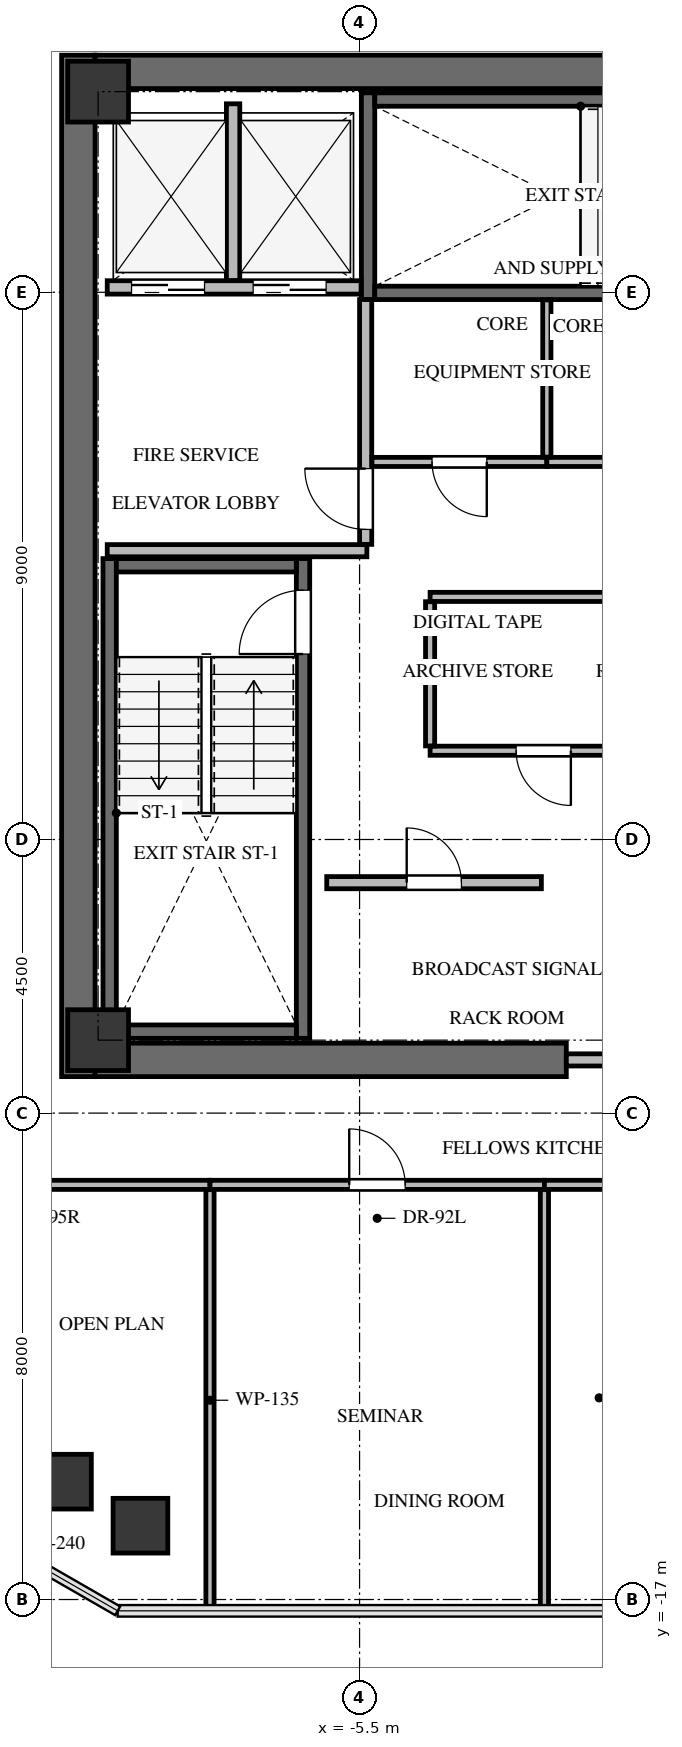
"""IFC4 building model, lengths in metres.
Left out: names, types, materials, properties, quantities, classifications, styles, units other than length and angle.
Written with IfcOpenShell. Run it as: python <this file> out.ifc"""

import sys

from ifc_helpers import new_model, si_unit, direction, frame, frame_2d, origin, origin_2d, place, context, subcontext, project, spatial, rectangle, extrude, source, transform, mapped, element, fill, save


model = new_model("IFC4")
c1 = context("Model", 3, precision=1e-05, world=origin(), true_north=direction((0.0, 1.0)))
c2 = subcontext(c1, "Body", "Model", "MODEL_VIEW")
j1 = project(units=[si_unit("LENGTHUNIT", "METRE"), si_unit("PLANEANGLEUNIT", "RADIAN")], contexts=[c1])
p1 = place(None, origin())
s1 = spatial("IfcSite", under=j1, at=p1, CompositionType="ELEMENT")
p2 = place(p1, origin())
s2 = spatial("IfcBuilding", under=s1, at=p2, CompositionType="ELEMENT")
p3 = place(p2, frame((0.0, 0.0, 254.7)))
s3 = spatial("IfcBuildingStorey", under=s2, at=p3, CompositionType="ELEMENT", Elevation=254.7)
p4 = place(p3, frame((-10.125, -8.4, 0.0), z_axis=(0.0, 0.0, 1.0), x_axis=(0.0, 1.0, 0.0)))
e1 = element("IfcWall", 1, at=p4, inside=s3, PredefinedType="SHEAR", context=c2, shape_type="SweptSolid", body=[
    extrude(rectangle(XDim=16.8, YDim=0.55, at=frame_2d((8.4, 0.0))), origin(), (0.0, 0.0, 1.0), 3.4),
])
p5 = place(p3, frame((-9.85, -8.125, 0.0), z_axis=(0.0, 0.0, 1.0), x_axis=(1.0, 0.0, 0.0)))
e2 = element("IfcWall", 2, at=p5, inside=s3, PredefinedType="SHEAR", context=c2, shape_type="SweptSolid", body=[
    extrude(rectangle(XDim=7.75, YDim=0.55, at=frame_2d((3.875, 0.0))), origin(), (0.0, 0.0, 1.0), 3.4),
])
p6 = place(p3, frame((-9.85, 8.125, 0.0), z_axis=(0.0, 0.0, 1.0), x_axis=(1.0, 0.0, 0.0)))
e3 = element("IfcWall", 3, at=p6, inside=s3, PredefinedType="SHEAR", context=c2, shape_type="SweptSolid", body=[
    extrude(rectangle(XDim=19.7, YDim=0.55, at=frame_2d((9.85, 0.0))), origin(), (0.0, 0.0, 1.0), 3.4),
])
p7 = place(p3, frame((-6.43, -7.77, -0.24), z_axis=(0.0, 0.0, 1.0), x_axis=(0.0, 1.0, 0.0)))
e4 = element("IfcWall", 4, at=p7, inside=s3, PredefinedType="SHEAR", context=c2, shape_type="SweptSolid", body=[
    extrude(rectangle(XDim=7.89, YDim=0.22, at=frame_2d((3.945, 0.0))), origin(), (0.0, 0.0, 1.0), 3.4),
])
p8 = place(p7, frame((6.32, 0.0, 0.0)))
e5 = element("IfcOpeningElement", 5, at=p8, cuts=e4, PredefinedType="OPENING", context=c2, shape_type="SweptSolid", body=[
    extrude(rectangle(XDim=1.05, YDim=2.15, at=frame_2d((0.525, 1.075))), frame((0.0, 0.12, 0.0), z_axis=(0.0, -1.0, 0.0), x_axis=(1.0, 0.0, 0.0)), (0.0, 0.0, 1.0), 0.24),
])
p9 = place(p3, frame((-9.61, 0.12, -0.24), z_axis=(0.0, 0.0, 1.0), x_axis=(0.0, -1.0, 0.0)))
e6 = element("IfcWall", 6, at=p9, inside=s3, PredefinedType="SHEAR", context=c2, shape_type="SweptSolid", body=[
    extrude(rectangle(XDim=7.89, YDim=0.22, at=frame_2d((3.945, 0.0))), origin(), (0.0, 0.0, 1.0), 3.4),
])
for number, where, z_axis, x_axis in (
    (7, (-9.5, -7.66, -0.24), (0.0, 0.0, 1.0), (1.0, 0.0, 0.0)),
    (8, (-6.54, 0.01, -0.24), (0.0, 0.0, 1.0), (-1.0, 0.0, 0.0)),
):
    element("IfcWall", number, at=place(p3, frame(where, z_axis=z_axis, x_axis=x_axis)), inside=s3, PredefinedType="SHEAR", context=c2, shape_type="SweptSolid", body=[
        extrude(rectangle(XDim=2.96, YDim=0.22, at=frame_2d((1.48, 0.0))), origin(), (0.0, 0.0, 1.0), 3.4),
    ])
p10 = place(p3, frame((-5.36, 7.78, -0.24), z_axis=(0.0, 0.0, 1.0), x_axis=(0.0, -1.0, 0.0)))
e9 = element("IfcWall", 9, at=p10, inside=s3, PredefinedType="SHEAR", context=c2, shape_type="SweptSolid", body=[
    extrude(rectangle(XDim=3.4, YDim=0.22, at=frame_2d((1.7, 0.0))), origin(), (0.0, 0.0, 1.0), 3.4),
])
p11 = place(p3, frame((-5.25, 4.49, -0.24), z_axis=(0.0, 0.0, 1.0), x_axis=(1.0, 0.0, 0.0)))
e10 = element("IfcWall", 10, at=p11, inside=s3, PredefinedType="SHEAR", context=c2, shape_type="SweptSolid", body=[
    extrude(rectangle(XDim=7.35, YDim=0.22, at=frame_2d((3.675, 0.0))), origin(), (0.0, 0.0, 1.0), 3.4),
])
p12 = place(p11, frame((5.85, 0.0, 0.0)))
e11 = element("IfcOpeningElement", 11, at=p12, cuts=e10, PredefinedType="OPENING", context=c2, shape_type="SweptSolid", body=[
    extrude(rectangle(XDim=1.05, YDim=2.15, at=frame_2d((0.525, 1.075))), frame((0.0, 0.12, 0.0), z_axis=(0.0, -1.0, 0.0), x_axis=(1.0, 0.0, 0.0)), (0.0, 0.0, 1.0), 0.24),
])
p13 = place(p3, frame((2.1, 7.67, -0.24), z_axis=(0.0, 0.0, 1.0), x_axis=(-1.0, 0.0, 0.0)))
e12 = element("IfcWall", 12, at=p13, inside=s3, PredefinedType="SHEAR", context=c2, shape_type="SweptSolid", body=[
    extrude(rectangle(XDim=7.35, YDim=0.22, at=frame_2d((3.675, 0.0))), origin(), (0.0, 0.0, 1.0), 3.4),
])
m1 = source(origin(), c2, "Body", "SweptSolid", [
    extrude(rectangle(XDim=1.0, YDim=1.0, at=origin_2d()), origin(), (0.0, 0.0, 1.0), 3.4),
])
for number, where, z_axis, x_axis in (
    (13, (-9.8, -7.8, -0.24), (0.0, 0.0, 1.0), (1.0, 0.0, 0.0)),
    (14, (-9.8, 7.8, -0.24), (0.0, 0.0, 1.0), (1.0, 0.0, 0.0)),
):
    element("IfcColumn", number, at=place(p3, frame(where, z_axis=z_axis, x_axis=x_axis)), inside=s3, PredefinedType="COLUMN", context=c2, shape_type="MappedRepresentation", body=[
        mapped(m1, transform((0.0, 0.0, 0.0), x_axis=(1.0, 0.0, 0.0), y_axis=(0.0, 1.0, 0.0), z_axis=(0.0, 0.0, 1.0), scale=1.0)),
    ])
m2 = source(origin(), c2, "Body", "SweptSolid", [
    extrude(rectangle(XDim=0.9, YDim=0.9, at=origin_2d()), origin(), (0.0, 0.0, 1.0), 3.4),
])
for number, where, z_axis, x_axis in (
    (15, (-10.361, -15.062, -0.24), (0.0, 0.0, 1.0), (1.0, 0.0, 0.0)),
    (16, (-9.104, -15.786, -0.24), (0.0, 0.0, 1.0), (1.0, 0.0, 0.0)),
):
    element("IfcColumn", number, at=place(p3, frame(where, z_axis=z_axis, x_axis=x_axis)), inside=s3, PredefinedType="COLUMN", context=c2, shape_type="MappedRepresentation", body=[
        mapped(m2, transform((0.0, 0.0, 0.0), x_axis=(1.0, 0.0, 0.0), y_axis=(0.0, 1.0, 0.0), z_axis=(0.0, 0.0, 1.0), scale=1.0)),
    ])
p14 = place(p3, frame((-2.1, -8.125, 0.0), z_axis=(0.0, 0.0, 1.0), x_axis=(1.0, 0.0, 0.0)))
e17 = element("IfcWall", 17, at=p14, inside=s3, PredefinedType="SOLIDWALL", context=c2, shape_type="SweptSolid", body=[
    extrude(rectangle(XDim=4.2, YDim=0.2, at=frame_2d((2.1, 0.0))), origin(), (0.0, 0.0, 1.0), 3.145),
])
p15 = place(p14, frame((1.2, 0.0, 0.0)))
e18 = element("IfcOpeningElement", 18, at=p15, cuts=e17, PredefinedType="OPENING", context=c2, shape_type="SweptSolid", body=[
    extrude(rectangle(XDim=1.8, YDim=2.15, at=frame_2d((0.9, 1.075))), frame((0.0, 0.11, 0.0), z_axis=(0.0, -1.0, 0.0), x_axis=(1.0, 0.0, 0.0)), (0.0, 0.0, 1.0), 0.22),
])
p16 = place(p3, frame((-9.65, 4.58, 0.0), z_axis=(0.0, 0.0, 1.0), x_axis=(1.0, 0.0, 0.0)))
e19 = element("IfcWall", 19, at=p16, inside=s3, PredefinedType="SOLIDWALL", context=c2, shape_type="SweptSolid", body=[
    extrude(rectangle(XDim=4.175, YDim=0.22, at=frame_2d((2.087, 0.0))), origin(), (0.0, 0.0, 1.0), 3.145),
])
p17 = place(p16, frame((0.4, 0.0, 0.0)))
e20 = element("IfcOpeningElement", 20, at=p17, cuts=e19, PredefinedType="OPENING", context=c2, shape_type="SweptSolid", body=[
    extrude(rectangle(XDim=1.2, YDim=2.15, at=frame_2d((0.6, 1.075))), frame((0.0, 0.12, 0.0), z_axis=(0.0, -1.0, 0.0), x_axis=(1.0, 0.0, 0.0)), (0.0, 0.0, 1.0), 0.24),
])
p18 = place(p16, frame((2.4, 0.0, 0.0)))
e21 = element("IfcOpeningElement", 21, at=p18, cuts=e19, PredefinedType="OPENING", context=c2, shape_type="SweptSolid", body=[
    extrude(rectangle(XDim=1.2, YDim=2.15, at=frame_2d((0.6, 1.075))), frame((0.0, 0.12, 0.0), z_axis=(0.0, -1.0, 0.0), x_axis=(1.0, 0.0, 0.0)), (0.0, 0.0, 1.0), 0.24),
])
p19 = place(p3, frame((-7.58, 4.694, 0.0), z_axis=(0.0, 0.0, 1.0), x_axis=(0.0, 1.0, 0.0)))
e22 = element("IfcWall", 22, at=p19, inside=s3, PredefinedType="SOLIDWALL", context=c2, shape_type="SweptSolid", body=[
    extrude(rectangle(XDim=2.906, YDim=0.22, at=frame_2d((1.453, 0.0))), origin(), (0.0, 0.0, 1.0), 3.145),
])
p20 = place(p3, frame((-9.65, 0.25, 0.0), z_axis=(0.0, 0.0, 1.0), x_axis=(1.0, 0.0, 0.0)))
e23 = element("IfcWall", 23, at=p20, inside=s3, PredefinedType="SOLIDWALL", context=c2, shape_type="SweptSolid", body=[
    extrude(rectangle(XDim=4.27, YDim=0.2, at=frame_2d((2.135, 0.0))), origin(), (0.0, 0.0, 1.0), 3.145),
])
p21 = place(p3, frame((-5.4, 0.354, 0.0), z_axis=(0.0, 0.0, 1.0), x_axis=(0.0, 1.0, 0.0)))
e24 = element("IfcWall", 24, at=p21, inside=s3, PredefinedType="SOLIDWALL", context=c2, shape_type="SweptSolid", body=[
    extrude(rectangle(XDim=4.026, YDim=0.2, at=frame_2d((2.013, 0.0))), origin(), (0.0, 0.0, 1.0), 3.145),
])
p22 = place(p21, frame((0.246, 0.0, 0.0)))
e25 = element("IfcOpeningElement", 25, at=p22, cuts=e24, PredefinedType="OPENING", context=c2, shape_type="SweptSolid", body=[
    extrude(rectangle(XDim=1.0, YDim=2.15, at=frame_2d((0.5, 1.075))), frame((0.0, 0.11, 0.0), z_axis=(0.0, -1.0, 0.0), x_axis=(1.0, 0.0, 0.0)), (0.0, 0.0, 1.0), 0.22),
])
p23 = place(p3, frame((-6.04, -5.21, 0.0), z_axis=(0.0, 0.0, 1.0), x_axis=(1.0, 0.0, 0.0)))
e26 = element("IfcWall", 26, at=p23, inside=s3, PredefinedType="SOLIDWALL", context=c2, shape_type="SweptSolid", body=[
    extrude(rectangle(XDim=3.53, YDim=0.2, at=frame_2d((1.765, 0.0))), origin(), (0.0, 0.0, 1.0), 3.145),
])
p24 = place(p23, frame((1.315, 0.0, 0.0)))
e27 = element("IfcOpeningElement", 27, at=p24, cuts=e26, PredefinedType="OPENING", context=c2, shape_type="SweptSolid", body=[
    extrude(rectangle(XDim=0.9, YDim=2.05, at=frame_2d((0.45, 1.025))), frame((0.0, 0.11, 0.0), z_axis=(0.0, -1.0, 0.0), x_axis=(1.0, 0.0, 0.0)), (0.0, 0.0, 1.0), 0.22),
])
p25 = place(p3, frame((-0.61, -3.04, 0.0), z_axis=(0.0, 0.0, 1.0), x_axis=(-1.0, 0.0, 0.0)))
e28 = element("IfcWall", 28, at=p25, inside=s3, PredefinedType="PARTITIONING", context=c2, shape_type="SweptSolid", body=[
    extrude(rectangle(XDim=3.73, YDim=0.15, at=frame_2d((1.865, 0.0))), origin(), (0.0, 0.0, 1.0), 3.145),
])
p26 = place(p25, frame((1.415, 0.0, 0.0)))
e29 = element("IfcOpeningElement", 29, at=p26, cuts=e28, PredefinedType="OPENING", context=c2, shape_type="SweptSolid", body=[
    extrude(rectangle(XDim=0.9, YDim=2.05, at=frame_2d((0.45, 1.025))), frame((0.0, 0.085, 0.0), z_axis=(0.0, -1.0, 0.0), x_axis=(1.0, 0.0, 0.0)), (0.0, 0.0, 1.0), 0.17),
])
p27 = place(p3, frame((-4.34, -0.51, 0.0), z_axis=(0.0, 0.0, 1.0), x_axis=(1.0, 0.0, 0.0)))
e30 = element("IfcWall", 30, at=p27, inside=s3, PredefinedType="PARTITIONING", context=c2, shape_type="SweptSolid", body=[
    extrude(rectangle(XDim=3.73, YDim=0.15, at=frame_2d((1.865, 0.0))), origin(), (0.0, 0.0, 1.0), 3.145),
])
p28 = place(p3, frame((-4.34, -2.961, 0.0), z_axis=(0.0, 0.0, 1.0), x_axis=(0.0, 1.0, 0.0)))
e31 = element("IfcWall", 31, at=p28, inside=s3, PredefinedType="PARTITIONING", context=c2, shape_type="SweptSolid", body=[
    extrude(rectangle(XDim=2.372, YDim=0.15, at=frame_2d((1.186, 0.0))), origin(), (0.0, 0.0, 1.0), 3.145),
])
p29 = place(p3, frame((-2.42, 1.71, 0.0), z_axis=(0.0, 0.0, 1.0), x_axis=(-1.0, 0.0, 0.0)))
e32 = element("IfcWall", 32, at=p29, inside=s3, PredefinedType="PARTITIONING", context=c2, shape_type="SweptSolid", body=[
    extrude(rectangle(XDim=2.876, YDim=0.15, at=frame_2d((1.438, 0.0))), origin(), (0.0, 0.0, 1.0), 3.145),
])
p30 = place(p29, frame((0.988, 0.0, 0.0)))
e33 = element("IfcOpeningElement", 33, at=p30, cuts=e32, PredefinedType="OPENING", context=c2, shape_type="SweptSolid", body=[
    extrude(rectangle(XDim=0.9, YDim=2.05, at=frame_2d((0.45, 1.025))), frame((0.0, 0.085, 0.0), z_axis=(0.0, -1.0, 0.0), x_axis=(1.0, 0.0, 0.0)), (0.0, 0.0, 1.0), 0.17),
])
p31 = place(p3, frame((0.52, 1.71, 0.0), z_axis=(0.0, 0.0, 1.0), x_axis=(-1.0, 0.0, 0.0)))
e34 = element("IfcWall", 34, at=p31, inside=s3, PredefinedType="PARTITIONING", context=c2, shape_type="SweptSolid", body=[
    extrude(rectangle(XDim=2.94, YDim=0.15, at=frame_2d((1.47, 0.0))), origin(), (0.0, 0.0, 1.0), 3.145),
])
p32 = place(p31, frame((1.02, 0.0, 0.0)))
e35 = element("IfcOpeningElement", 35, at=p32, cuts=e34, PredefinedType="OPENING", context=c2, shape_type="SweptSolid", body=[
    extrude(rectangle(XDim=0.9, YDim=2.05, at=frame_2d((0.45, 1.025))), frame((0.0, 0.085, 0.0), z_axis=(0.0, -1.0, 0.0), x_axis=(1.0, 0.0, 0.0)), (0.0, 0.0, 1.0), 0.17),
])
p33 = place(p3, frame((-12.39, -10.18, 0.0), z_axis=(0.0, 0.0, 1.0), x_axis=(1.0, 0.0, 0.0)))
e36 = element("IfcWall", 36, at=p33, inside=s3, PredefinedType="PARTITIONING", context=c2, shape_type="SweptSolid", body=[
    extrude(rectangle(XDim=4.43, YDim=0.15, at=frame_2d((2.215, 0.0))), origin(), (0.0, 0.0, 1.0), 3.145),
])
p34 = place(p33, frame((0.35, 0.0, 0.0)))
e37 = element("IfcOpeningElement", 37, at=p34, cuts=e36, PredefinedType="OPENING", context=c2, shape_type="SweptSolid", body=[
    extrude(rectangle(XDim=0.95, YDim=2.1, at=frame_2d((0.475, 1.05))), frame((0.0, 0.085, 0.0), z_axis=(0.0, -1.0, 0.0), x_axis=(1.0, 0.0, 0.0)), (0.0, 0.0, 1.0), 0.17),
])
p35 = place(p3, frame((-7.96, -10.18, 0.0), z_axis=(0.0, 0.0, 1.0), x_axis=(1.0, 0.0, 0.0)))
e38 = element("IfcWall", 38, at=p35, inside=s3, PredefinedType="PARTITIONING", context=c2, shape_type="SweptSolid", body=[
    extrude(rectangle(XDim=5.5, YDim=0.15, at=frame_2d((2.75, 0.0))), origin(), (0.0, 0.0, 1.0), 2.401),
])
p36 = place(p35, frame((2.29, 0.0, 0.0)))
e39 = element("IfcOpeningElement", 39, at=p36, cuts=e38, PredefinedType="OPENING", context=c2, shape_type="SweptSolid", body=[
    extrude(rectangle(XDim=0.92, YDim=2.1, at=frame_2d((0.46, 1.05))), frame((0.0, 0.085, 0.0), z_axis=(0.0, -1.0, 0.0), x_axis=(1.0, 0.0, 0.0)), (0.0, 0.0, 1.0), 0.17),
])
p37 = place(p3, frame((-2.46, -10.18, 0.0), z_axis=(0.0, 0.0, 1.0), x_axis=(1.0, 0.0, 0.0)))
e40 = element("IfcWall", 40, at=p37, inside=s3, PredefinedType="PARTITIONING", context=c2, shape_type="SweptSolid", body=[
    extrude(rectangle(XDim=1.371, YDim=0.15, at=frame_2d((0.686, 0.0))), origin(), (0.0, 0.0, 1.0), 3.145),
])
p38 = place(p3, frame((-2.42, 4.375, 0.0), z_axis=(0.0, 0.0, 1.0), x_axis=(0.0, -1.0, 0.0)))
e41 = element("IfcWall", 41, at=p38, inside=s3, PredefinedType="PARTITIONING", context=c2, shape_type="SweptSolid", body=[
    extrude(rectangle(XDim=2.586, YDim=0.135, at=frame_2d((1.293, 0.0))), origin(), (0.0, 0.0, 1.0), 3.145),
])
p39 = place(p3, frame((-7.96, -10.259, 0.0), z_axis=(0.0, 0.0, 1.0), x_axis=(0.0, -1.0, 0.0)))
e42 = element("IfcWall", 42, at=p39, inside=s3, PredefinedType="PARTITIONING", context=c2, shape_type="SweptSolid", body=[
    extrude(rectangle(XDim=6.927, YDim=0.135, at=frame_2d((3.463, 0.0))), origin(), (0.0, 0.0, 1.0), 2.401),
])
p40 = place(p3, frame((-2.46, -10.259, 0.0), z_axis=(0.0, 0.0, 1.0), x_axis=(0.0, -1.0, 0.0)))
e43 = element("IfcWall", 43, at=p40, inside=s3, PredefinedType="PARTITIONING", context=c2, shape_type="SweptSolid", body=[
    extrude(rectangle(XDim=6.927, YDim=0.135, at=frame_2d((3.463, 0.0))), origin(), (0.0, 0.0, 1.0), 2.499),
])
m3 = source(origin(), c2, "Body", "SweptSolid", [
    extrude(rectangle(XDim=1.05, YDim=2.15, at=frame_2d((0.525, 1.075))), frame((0.0, 0.025, 0.0), z_axis=(0.0, -1.0, 0.0), x_axis=(1.0, 0.0, 0.0)), (0.0, 0.0, 1.0), 0.05),
])
p41 = place(p8, origin())
e44 = element("IfcDoor", 44, at=p41, inside=s3, OperationType="SINGLE_SWING_LEFT", PredefinedType="DOOR", context=c2, shape_type="MappedRepresentation", body=[
    mapped(m3, transform((0.0, 0.0, 0.0), x_axis=(1.0, 0.0, 0.0), y_axis=(0.0, 1.0, 0.0), z_axis=(0.0, 0.0, 1.0), scale=1.0)),
])
fill(e5, e44)
m4 = source(origin(), c2, "Body", "SweptSolid", [
    extrude(rectangle(XDim=1.2, YDim=2.15, at=frame_2d((0.6, 1.075))), frame((0.0, 0.025, 0.0), z_axis=(0.0, -1.0, 0.0), x_axis=(1.0, 0.0, 0.0)), (0.0, 0.0, 1.0), 0.05),
])
p42 = place(p17, origin())
e45 = element("IfcDoor", 45, at=p42, inside=s3, OperationType="DOUBLE_DOOR_SLIDING", PredefinedType="DOOR", context=c2, shape_type="MappedRepresentation", body=[
    mapped(m4, transform((0.0, 0.0, 0.0), x_axis=(1.0, 0.0, 0.0), y_axis=(0.0, 1.0, 0.0), z_axis=(0.0, 0.0, 1.0), scale=1.0)),
])
fill(e20, e45)
p43 = place(p18, origin())
e46 = element("IfcDoor", 46, at=p43, inside=s3, OperationType="DOUBLE_DOOR_SLIDING", PredefinedType="DOOR", context=c2, shape_type="MappedRepresentation", body=[
    mapped(m4, transform((0.0, 0.0, 0.0), x_axis=(1.0, 0.0, 0.0), y_axis=(0.0, 1.0, 0.0), z_axis=(0.0, 0.0, 1.0), scale=1.0)),
])
fill(e21, e46)
m5 = source(origin(), c2, "Body", "SweptSolid", [
    extrude(rectangle(XDim=1.0, YDim=2.15, at=frame_2d((0.5, 1.075))), frame((0.0, 0.025, 0.0), z_axis=(0.0, -1.0, 0.0), x_axis=(1.0, 0.0, 0.0)), (0.0, 0.0, 1.0), 0.05),
])
p44 = place(p22, origin())
e47 = element("IfcDoor", 47, at=p44, inside=s3, OperationType="SINGLE_SWING_RIGHT", PredefinedType="DOOR", context=c2, shape_type="MappedRepresentation", body=[
    mapped(m5, transform((0.0, 0.0, 0.0), x_axis=(1.0, 0.0, 0.0), y_axis=(0.0, 1.0, 0.0), z_axis=(0.0, 0.0, 1.0), scale=1.0)),
])
fill(e25, e47)
m6 = source(origin(), c2, "Body", "SweptSolid", [
    extrude(rectangle(XDim=0.9, YDim=2.05, at=frame_2d((0.45, 1.025))), frame((0.0, 0.025, 0.0), z_axis=(0.0, -1.0, 0.0), x_axis=(1.0, 0.0, 0.0)), (0.0, 0.0, 1.0), 0.05),
])
p45 = place(p24, origin())
e48 = element("IfcDoor", 48, at=p45, inside=s3, OperationType="SINGLE_SWING_LEFT", PredefinedType="DOOR", context=c2, shape_type="MappedRepresentation", body=[
    mapped(m6, transform((0.0, 0.0, 0.0), x_axis=(1.0, 0.0, 0.0), y_axis=(0.0, 1.0, 0.0), z_axis=(0.0, 0.0, 1.0), scale=1.0)),
])
fill(e27, e48)
p46 = place(p26, origin())
e49 = element("IfcDoor", 49, at=p46, inside=s3, OperationType="SINGLE_SWING_LEFT", PredefinedType="DOOR", context=c2, shape_type="MappedRepresentation", body=[
    mapped(m6, transform((0.0, 0.0, 0.0), x_axis=(1.0, 0.0, 0.0), y_axis=(0.0, 1.0, 0.0), z_axis=(0.0, 0.0, 1.0), scale=1.0)),
])
fill(e29, e49)
p47 = place(p30, origin())
e50 = element("IfcDoor", 50, at=p47, inside=s3, OperationType="SINGLE_SWING_LEFT", PredefinedType="DOOR", context=c2, shape_type="MappedRepresentation", body=[
    mapped(m6, transform((0.0, 0.0, 0.0), x_axis=(1.0, 0.0, 0.0), y_axis=(0.0, 1.0, 0.0), z_axis=(0.0, 0.0, 1.0), scale=1.0)),
])
fill(e33, e50)
m7 = source(origin(), c2, "Body", "SweptSolid", [
    extrude(rectangle(XDim=0.92, YDim=2.1, at=frame_2d((0.46, 1.05))), frame((0.0, 0.025, 0.0), z_axis=(0.0, -1.0, 0.0), x_axis=(1.0, 0.0, 0.0)), (0.0, 0.0, 1.0), 0.05),
])
p48 = place(p36, origin())
e51 = element("IfcDoor", 51, at=p48, inside=s3, OperationType="SINGLE_SWING_LEFT", PredefinedType="DOOR", context=c2, shape_type="MappedRepresentation", body=[
    mapped(m7, transform((0.0, 0.0, 0.0), x_axis=(1.0, 0.0, 0.0), y_axis=(0.0, 1.0, 0.0), z_axis=(0.0, 0.0, 1.0), scale=1.0)),
])
fill(e39, e51)
save(model, sys.argv[1])
